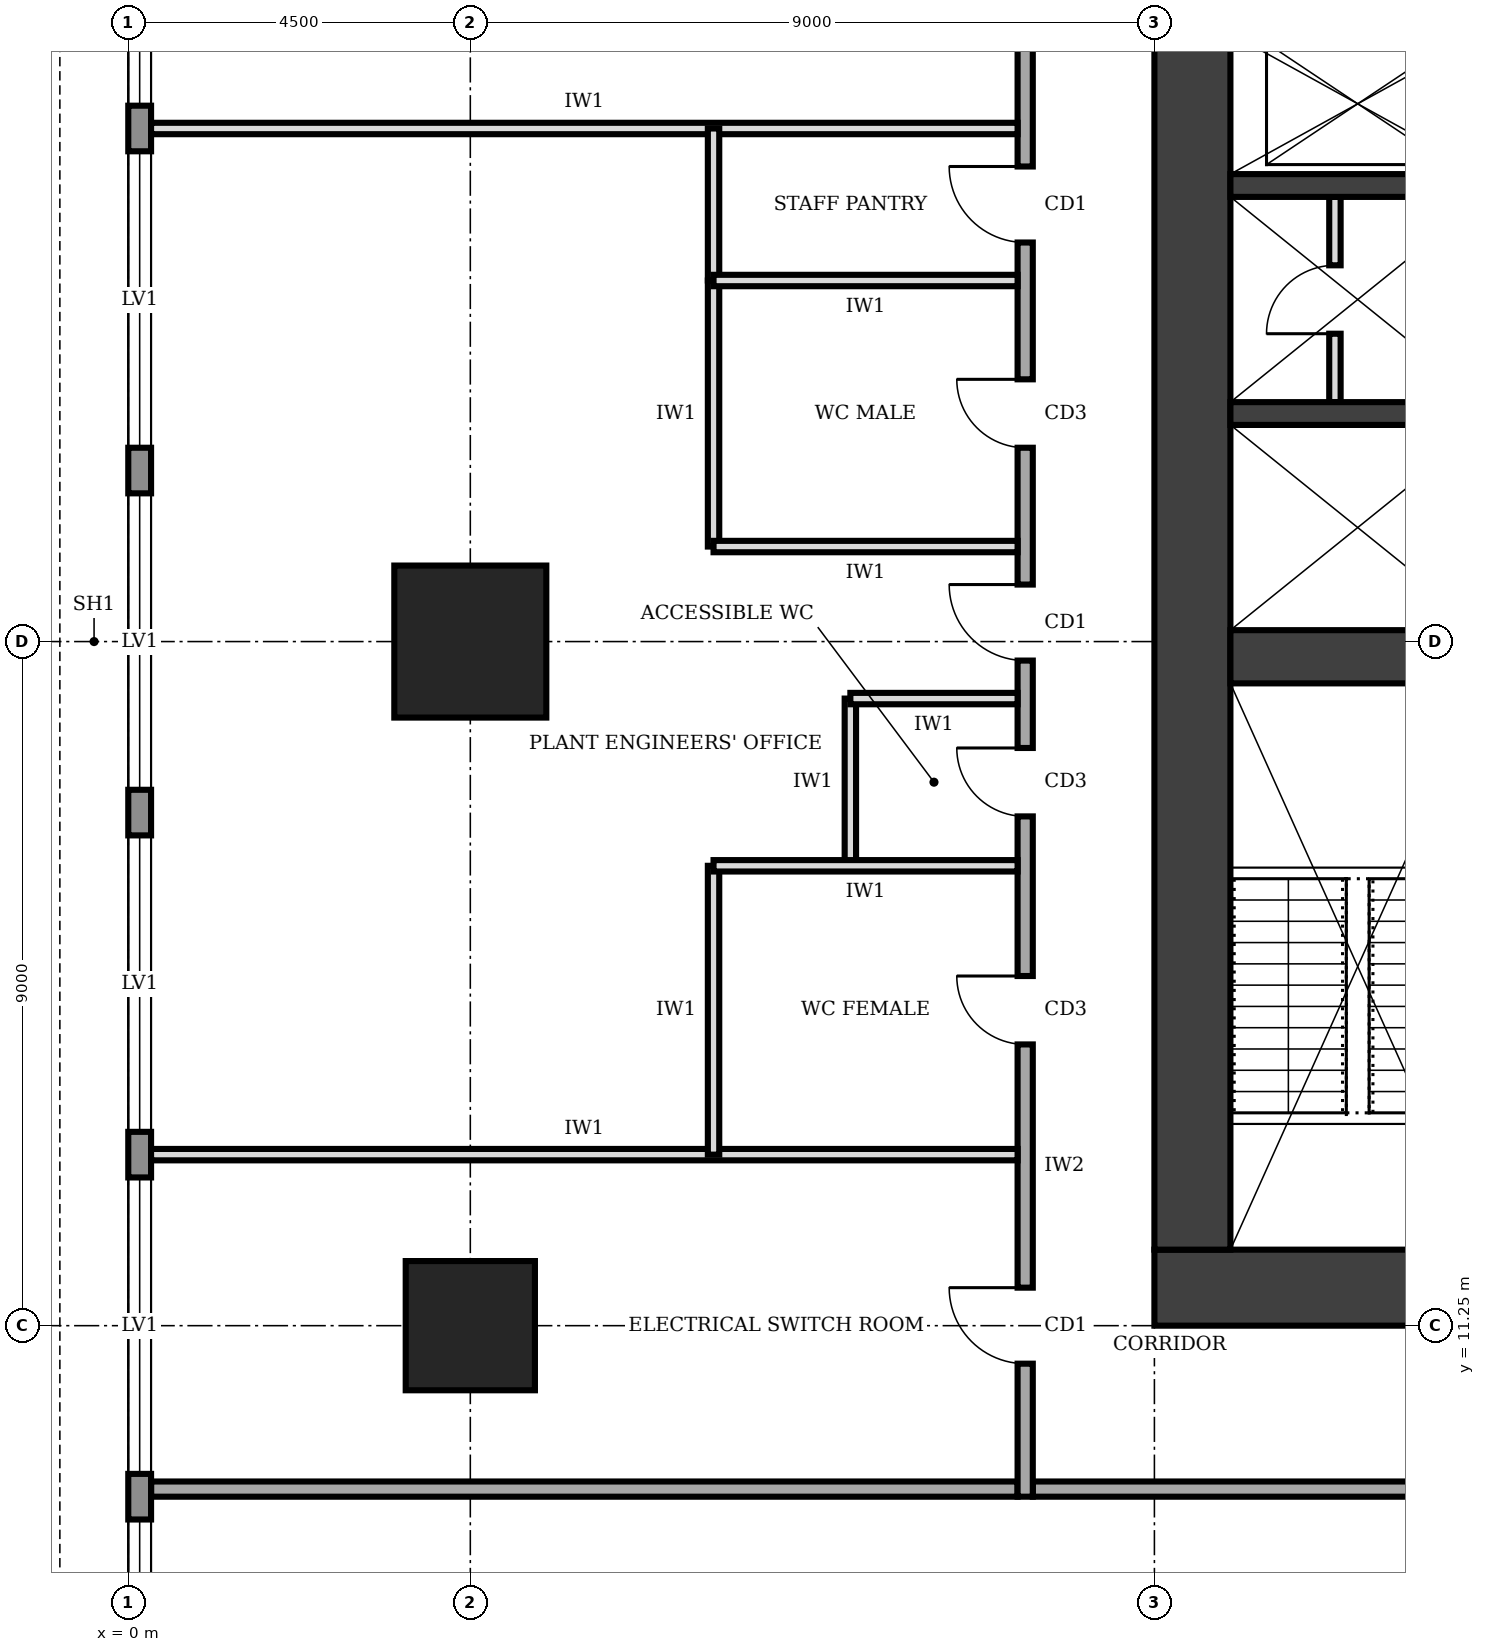
"""IFC4 building model, lengths in metres.
Left out: names, types, materials, properties, quantities, classifications, styles, units other than length and angle.
Written with IfcOpenShell. Run it as: python <this file> out.ifc"""

import sys

from ifc_helpers import new_model, si_unit, direction, frame, frame_2d, origin, origin_2d, place, context, subcontext, project, spatial, rectangle, extrude, element, fill, save


model = new_model("IFC4")
c1 = context("Model", 3, precision=1e-05, world=origin(), true_north=direction((0.0, 1.0)))
c2 = subcontext(c1, "Body", "Model", "MODEL_VIEW")
j1 = project(units=[si_unit("LENGTHUNIT", "METRE"), si_unit("PLANEANGLEUNIT", "RADIAN")], contexts=[c1])
p1 = place(None, origin())
s1 = spatial("IfcSite", under=j1, at=p1, CompositionType="ELEMENT")
p2 = place(p1, origin())
s2 = spatial("IfcBuilding", under=s1, at=p2, CompositionType="ELEMENT")
p3 = place(p2, frame((0.0, 0.0, 289.0)))
s3 = spatial("IfcBuildingStorey", under=s2, at=p3, CompositionType="ELEMENT", Elevation=289.0)
p4 = place(p3, frame((13.5, 11.75, 0.0), z_axis=(0.0, 0.0, 1.0), x_axis=(1.0, 0.0, 0.0)))
e1 = element("IfcWall", 1, at=p4, inside=s3, PredefinedType="SHEAR", context=c2, shape_type="SweptSolid", body=[
    extrude(rectangle(XDim=13.5, YDim=1.0, at=frame_2d((6.75, 0.0))), origin(), (0.0, 0.0, 1.0), 4.0),
])
p5 = place(p4, frame((4.75, 0.0, 0.0)))
e2 = element("IfcOpeningElement", 2, at=p5, cuts=e1, PredefinedType="OPENING", context=c2, shape_type="SweptSolid", body=[
    extrude(rectangle(XDim=1.0, YDim=2.1, at=frame_2d((0.5, 1.05))), frame((0.0, 0.51, 0.0), z_axis=(0.0, -1.0, 0.0), x_axis=(1.0, 0.0, 0.0)), (0.0, 0.0, 1.0), 1.02),
])
p6 = place(p3, frame((14.0, 28.25, 0.0), z_axis=(0.0, 0.0, 1.0), x_axis=(0.0, -1.0, 0.0)))
e3 = element("IfcWall", 3, at=p6, inside=s3, PredefinedType="SHEAR", context=c2, shape_type="SweptSolid", body=[
    extrude(rectangle(XDim=16.0, YDim=1.0, at=frame_2d((8.0, 0.0))), origin(), (0.0, 0.0, 1.0), 4.0),
])
p7 = place(p3, frame((14.5, 20.05, 0.0), z_axis=(0.0, 0.0, 1.0), x_axis=(1.0, 0.0, 0.0)))
e4 = element("IfcWall", 4, at=p7, inside=s3, PredefinedType="SHEAR", context=c2, shape_type="SweptSolid", body=[
    extrude(rectangle(XDim=3.35, YDim=0.7, at=frame_2d((1.675, 0.0))), origin(), (0.0, 0.0, 1.0), 4.0),
])
for number, where, z_axis, x_axis in (
    (5, (14.5, 23.25, 0.0), (0.0, 0.0, 1.0), (1.0, 0.0, 0.0)),
    (6, (14.5, 26.25, 0.0), (0.0, 0.0, 1.0), (1.0, 0.0, 0.0)),
):
    element("IfcWall", number, at=place(p3, frame(where, z_axis=z_axis, x_axis=x_axis)), inside=s3, PredefinedType="SHEAR", context=c2, shape_type="SweptSolid", body=[
        extrude(rectangle(XDim=3.35, YDim=0.3, at=frame_2d((1.675, 0.0))), origin(), (0.0, 0.0, 1.0), 4.0),
    ])
p8 = place(p3, frame((4.5, 11.25, 0.0), z_axis=(0.0, 0.0, 1.0), x_axis=(1.0, 0.0, 0.0)))
e7 = element("IfcColumn", 7, at=p8, inside=s3, PredefinedType="COLUMN", context=c2, shape_type="SweptSolid", body=[
    extrude(rectangle(XDim=1.7, YDim=1.7, at=origin_2d()), origin(), (0.0, 0.0, 1.0), 4.0),
])
p9 = place(p3, frame((4.5, 20.25, 0.0), z_axis=(0.0, 0.0, 1.0), x_axis=(1.0, 0.0, 0.0)))
e8 = element("IfcColumn", 8, at=p9, inside=s3, PredefinedType="COLUMN", context=c2, shape_type="SweptSolid", body=[
    extrude(rectangle(XDim=2.0, YDim=2.0, at=origin_2d()), origin(), (0.0, 0.0, 1.0), 4.0),
])
p10 = place(p3, frame((0.15, 35.98, 0.0), z_axis=(0.0, 0.0, 1.0), x_axis=(0.0, -1.0, 0.0)))
e9 = element("IfcWall", 9, at=p10, inside=s3, PredefinedType="STANDARD", context=c2, shape_type="SweptSolid", body=[
    extrude(rectangle(XDim=31.46, YDim=0.3, at=frame_2d((15.73, 0.0))), origin(), (0.0, 0.0, 1.0), 3.75),
])
p11 = place(p10, frame((27.28, 0.0, 0.9)))
e10 = element("IfcOpeningElement", 10, at=p11, cuts=e9, PredefinedType="OPENING", context=c2, shape_type="SweptSolid", body=[
    extrude(rectangle(XDim=3.9, YDim=2.2, at=frame_2d((1.95, 1.1))), frame((0.0, 0.16, 0.0), z_axis=(0.0, -1.0, 0.0), x_axis=(1.0, 0.0, 0.0)), (0.0, 0.0, 1.0), 0.32),
])
p12 = place(p10, frame((22.78, 0.0, 0.9)))
e11 = element("IfcOpeningElement", 11, at=p12, cuts=e9, PredefinedType="OPENING", context=c2, shape_type="SweptSolid", body=[
    extrude(rectangle(XDim=3.9, YDim=2.2, at=frame_2d((1.95, 1.1))), frame((0.0, 0.16, 0.0), z_axis=(0.0, -1.0, 0.0), x_axis=(1.0, 0.0, 0.0)), (0.0, 0.0, 1.0), 0.32),
])
p13 = place(p10, frame((18.28, 0.0, 0.9)))
e12 = element("IfcOpeningElement", 12, at=p13, cuts=e9, PredefinedType="OPENING", context=c2, shape_type="SweptSolid", body=[
    extrude(rectangle(XDim=3.9, YDim=2.2, at=frame_2d((1.95, 1.1))), frame((0.0, 0.16, 0.0), z_axis=(0.0, -1.0, 0.0), x_axis=(1.0, 0.0, 0.0)), (0.0, 0.0, 1.0), 0.32),
])
p14 = place(p10, frame((13.78, 0.0, 0.9)))
e13 = element("IfcOpeningElement", 13, at=p14, cuts=e9, PredefinedType="OPENING", context=c2, shape_type="SweptSolid", body=[
    extrude(rectangle(XDim=3.9, YDim=2.2, at=frame_2d((1.95, 1.1))), frame((0.0, 0.16, 0.0), z_axis=(0.0, -1.0, 0.0), x_axis=(1.0, 0.0, 0.0)), (0.0, 0.0, 1.0), 0.32),
])
p15 = place(p10, frame((9.28, 0.0, 0.9)))
e14 = element("IfcOpeningElement", 14, at=p15, cuts=e9, PredefinedType="OPENING", context=c2, shape_type="SweptSolid", body=[
    extrude(rectangle(XDim=3.9, YDim=2.2, at=frame_2d((1.95, 1.1))), frame((0.0, 0.16, 0.0), z_axis=(0.0, -1.0, 0.0), x_axis=(1.0, 0.0, 0.0)), (0.0, 0.0, 1.0), 0.32),
])
p16 = place(p10, frame((4.78, 0.0, 0.9)))
e15 = element("IfcOpeningElement", 15, at=p16, cuts=e9, PredefinedType="OPENING", context=c2, shape_type="SweptSolid", body=[
    extrude(rectangle(XDim=3.9, YDim=2.2, at=frame_2d((1.95, 1.1))), frame((0.0, 0.16, 0.0), z_axis=(0.0, -1.0, 0.0), x_axis=(1.0, 0.0, 0.0)), (0.0, 0.0, 1.0), 0.32),
])
p17 = place(p3, frame((15.875, 23.4, 0.0), z_axis=(0.0, 0.0, 1.0), x_axis=(0.0, 1.0, 0.0)))
e16 = element("IfcWall", 16, at=p17, inside=s3, PredefinedType="PARTITIONING", context=c2, shape_type="SweptSolid", body=[
    extrude(rectangle(XDim=2.7, YDim=0.15, at=frame_2d((1.35, 0.0))), origin(), (0.0, 0.0, 1.0), 3.75),
])
p18 = place(p17, frame((0.9, 0.0, 0.0)))
e17 = element("IfcOpeningElement", 17, at=p18, cuts=e16, PredefinedType="OPENING", context=c2, shape_type="SweptSolid", body=[
    extrude(rectangle(XDim=0.9, YDim=2.1, at=frame_2d((0.45, 1.05))), frame((0.0, 0.085, 0.0), z_axis=(0.0, -1.0, 0.0), x_axis=(1.0, 0.0, 0.0)), (0.0, 0.0, 1.0), 0.17),
])
p19 = place(p3, frame((11.9, 9.1, 0.0), z_axis=(0.0, 0.0, 1.0), x_axis=(1.0, 0.0, 0.0)))
e18 = element("IfcWall", 18, at=p19, inside=s3, PredefinedType="SOLIDWALL", context=c2, shape_type="SweptSolid", body=[
    extrude(rectangle(XDim=16.9, YDim=0.2, at=frame_2d((8.45, 0.0))), origin(), (0.0, 0.0, 1.0), 3.75),
])
p20 = place(p19, frame((7.15, 0.0, 0.0)))
e19 = element("IfcOpeningElement", 19, at=p20, cuts=e18, PredefinedType="OPENING", context=c2, shape_type="SweptSolid", body=[
    extrude(rectangle(XDim=2.4, YDim=2.7, at=frame_2d((1.2, 1.35))), frame((0.0, 0.11, 0.0), z_axis=(0.0, -1.0, 0.0), x_axis=(1.0, 0.0, 0.0)), (0.0, 0.0, 1.0), 0.22),
])
p21 = place(p3, frame((11.8, 31.3, 0.0), z_axis=(0.0, 0.0, 1.0), x_axis=(0.0, -1.0, 0.0)))
e20 = element("IfcWall", 20, at=p21, inside=s3, PredefinedType="SOLIDWALL", context=c2, shape_type="SweptSolid", body=[
    extrude(rectangle(XDim=22.3, YDim=0.2, at=frame_2d((11.15, 0.0))), origin(), (0.0, 0.0, 1.0), 3.75),
])
p22 = place(p21, frame((19.55, 0.0, 0.0)))
e21 = element("IfcOpeningElement", 21, at=p22, cuts=e20, PredefinedType="OPENING", context=c2, shape_type="SweptSolid", body=[
    extrude(rectangle(XDim=1.0, YDim=2.1, at=frame_2d((0.5, 1.05))), frame((0.0, 0.11, 0.0), z_axis=(0.0, -1.0, 0.0), x_axis=(1.0, 0.0, 0.0)), (0.0, 0.0, 1.0), 0.22),
])
p23 = place(p21, frame((15.45, 0.0, 0.0)))
e22 = element("IfcOpeningElement", 22, at=p23, cuts=e20, PredefinedType="OPENING", context=c2, shape_type="SweptSolid", body=[
    extrude(rectangle(XDim=0.9, YDim=2.1, at=frame_2d((0.45, 1.05))), frame((0.0, 0.11, 0.0), z_axis=(0.0, -1.0, 0.0), x_axis=(1.0, 0.0, 0.0)), (0.0, 0.0, 1.0), 0.22),
])
p24 = place(p21, frame((12.45, 0.0, 0.0)))
e23 = element("IfcOpeningElement", 23, at=p24, cuts=e20, PredefinedType="OPENING", context=c2, shape_type="SweptSolid", body=[
    extrude(rectangle(XDim=0.9, YDim=2.1, at=frame_2d((0.45, 1.05))), frame((0.0, 0.11, 0.0), z_axis=(0.0, -1.0, 0.0), x_axis=(1.0, 0.0, 0.0)), (0.0, 0.0, 1.0), 0.22),
])
p25 = place(p21, frame((7.6, 0.0, 0.0)))
e24 = element("IfcOpeningElement", 24, at=p25, cuts=e20, PredefinedType="OPENING", context=c2, shape_type="SweptSolid", body=[
    extrude(rectangle(XDim=0.9, YDim=2.1, at=frame_2d((0.45, 1.05))), frame((0.0, 0.11, 0.0), z_axis=(0.0, -1.0, 0.0), x_axis=(1.0, 0.0, 0.0)), (0.0, 0.0, 1.0), 0.22),
])
p26 = place(p21, frame((4.8, 0.0, 0.0)))
e25 = element("IfcOpeningElement", 25, at=p26, cuts=e20, PredefinedType="OPENING", context=c2, shape_type="SweptSolid", body=[
    extrude(rectangle(XDim=1.0, YDim=2.1, at=frame_2d((0.5, 1.05))), frame((0.0, 0.11, 0.0), z_axis=(0.0, -1.0, 0.0), x_axis=(1.0, 0.0, 0.0)), (0.0, 0.0, 1.0), 0.22),
])
p27 = place(p21, frame((10.3, 0.0, 0.0)))
e26 = element("IfcOpeningElement", 26, at=p27, cuts=e20, PredefinedType="OPENING", context=c2, shape_type="SweptSolid", body=[
    extrude(rectangle(XDim=1.0, YDim=2.1, at=frame_2d((0.5, 1.05))), frame((0.0, 0.11, 0.0), z_axis=(0.0, -1.0, 0.0), x_axis=(1.0, 0.0, 0.0)), (0.0, 0.0, 1.0), 0.22),
])
p28 = place(p21, frame((1.55, 0.0, 0.0)))
e27 = element("IfcOpeningElement", 27, at=p28, cuts=e20, PredefinedType="OPENING", context=c2, shape_type="SweptSolid", body=[
    extrude(rectangle(XDim=1.0, YDim=2.1, at=frame_2d((0.5, 1.05))), frame((0.0, 0.11, 0.0), z_axis=(0.0, -1.0, 0.0), x_axis=(1.0, 0.0, 0.0)), (0.0, 0.0, 1.0), 0.22),
])
p29 = place(p3, frame((0.3, 9.1, 0.0), z_axis=(0.0, 0.0, 1.0), x_axis=(1.0, 0.0, 0.0)))
e28 = element("IfcWall", 28, at=p29, inside=s3, PredefinedType="SOLIDWALL", context=c2, shape_type="SweptSolid", body=[
    extrude(rectangle(XDim=11.4, YDim=0.2, at=frame_2d((5.7, 0.0))), origin(), (0.0, 0.0, 1.0), 3.75),
])
for number, where, z_axis, x_axis in (
    (29, (0.3, 13.5, 0.0), (0.0, 0.0, 1.0), (1.0, 0.0, 0.0)),
    (30, (0.3, 27.0, 0.0), (0.0, 0.0, 1.0), (1.0, 0.0, 0.0)),
):
    element("IfcWall", number, at=place(p3, frame(where, z_axis=z_axis, x_axis=x_axis)), inside=s3, PredefinedType="PARTITIONING", context=c2, shape_type="SweptSolid", body=[
        extrude(rectangle(XDim=11.4, YDim=0.15, at=frame_2d((5.7, 0.0))), origin(), (0.0, 0.0, 1.0), 3.75),
    ])
p30 = place(p3, frame((11.7, 17.3, 0.0), z_axis=(0.0, 0.0, 1.0), x_axis=(-1.0, 0.0, 0.0)))
e31 = element("IfcWall", 31, at=p30, inside=s3, PredefinedType="PARTITIONING", context=c2, shape_type="SweptSolid", body=[
    extrude(rectangle(XDim=4.0, YDim=0.15, at=frame_2d((2.0, 0.0))), origin(), (0.0, 0.0, 1.0), 3.75),
])
p31 = place(p3, frame((11.7, 19.5, 0.0), z_axis=(0.0, 0.0, 1.0), x_axis=(-1.0, 0.0, 0.0)))
e32 = element("IfcWall", 32, at=p31, inside=s3, PredefinedType="PARTITIONING", context=c2, shape_type="SweptSolid", body=[
    extrude(rectangle(XDim=2.2, YDim=0.15, at=frame_2d((1.1, 0.0))), origin(), (0.0, 0.0, 1.0), 2.85),
])
for number, where, z_axis, x_axis in (
    (33, (11.7, 21.5, 0.0), (0.0, 0.0, 1.0), (-1.0, 0.0, 0.0)),
    (34, (11.7, 25.0, 0.0), (0.0, 0.0, 1.0), (-1.0, 0.0, 0.0)),
):
    element("IfcWall", number, at=place(p3, frame(where, z_axis=z_axis, x_axis=x_axis)), inside=s3, PredefinedType="PARTITIONING", context=c2, shape_type="SweptSolid", body=[
        extrude(rectangle(XDim=4.0, YDim=0.15, at=frame_2d((2.0, 0.0))), origin(), (0.0, 0.0, 1.0), 3.75),
    ])
p32 = place(p3, frame((7.7, 13.5, 0.0), z_axis=(0.0, 0.0, 1.0), x_axis=(0.0, 1.0, 0.0)))
e35 = element("IfcWall", 35, at=p32, inside=s3, PredefinedType="PARTITIONING", context=c2, shape_type="SweptSolid", body=[
    extrude(rectangle(XDim=3.8, YDim=0.15, at=frame_2d((1.9, 0.0))), origin(), (0.0, 0.0, 1.0), 3.75),
])
p33 = place(p3, frame((9.5, 17.3, 0.0), z_axis=(0.0, 0.0, 1.0), x_axis=(0.0, 1.0, 0.0)))
e36 = element("IfcWall", 36, at=p33, inside=s3, PredefinedType="PARTITIONING", context=c2, shape_type="SweptSolid", body=[
    extrude(rectangle(XDim=2.2, YDim=0.15, at=frame_2d((1.1, 0.0))), origin(), (0.0, 0.0, 1.0), 3.75),
])
p34 = place(p3, frame((7.7, 21.5, 0.0), z_axis=(0.0, 0.0, 1.0), x_axis=(0.0, 1.0, 0.0)))
e37 = element("IfcWall", 37, at=p34, inside=s3, PredefinedType="PARTITIONING", context=c2, shape_type="SweptSolid", body=[
    extrude(rectangle(XDim=3.5, YDim=0.15, at=frame_2d((1.75, 0.0))), origin(), (0.0, 0.0, 1.0), 3.75),
])
p35 = place(p3, frame((7.7, 25.0, 0.0), z_axis=(0.0, 0.0, 1.0), x_axis=(0.0, 1.0, 0.0)))
e38 = element("IfcWall", 38, at=p35, inside=s3, PredefinedType="PARTITIONING", context=c2, shape_type="SweptSolid", body=[
    extrude(rectangle(XDim=2.0, YDim=0.15, at=frame_2d((1.0, 0.0))), origin(), (0.0, 0.0, 1.0), 3.75),
])
p36 = place(p11, origin())
e39 = element("IfcWindow", 39, at=p36, inside=s3, PartitioningType="SINGLE_PANEL", PredefinedType="WINDOW", context=c2, shape_type="SweptSolid", body=[
    extrude(rectangle(XDim=3.9, YDim=2.2, at=frame_2d((1.95, 1.1))), frame((0.0, 0.03, 0.0), z_axis=(0.0, -1.0, 0.0), x_axis=(1.0, 0.0, 0.0)), (0.0, 0.0, 1.0), 0.06),
])
fill(e10, e39)
p37 = place(p12, origin())
e40 = element("IfcWindow", 40, at=p37, inside=s3, PartitioningType="SINGLE_PANEL", PredefinedType="WINDOW", context=c2, shape_type="SweptSolid", body=[
    extrude(rectangle(XDim=3.9, YDim=2.2, at=frame_2d((1.95, 1.1))), frame((0.0, 0.03, 0.0), z_axis=(0.0, -1.0, 0.0), x_axis=(1.0, 0.0, 0.0)), (0.0, 0.0, 1.0), 0.06),
])
fill(e11, e40)
p38 = place(p13, origin())
e41 = element("IfcWindow", 41, at=p38, inside=s3, PartitioningType="SINGLE_PANEL", PredefinedType="WINDOW", context=c2, shape_type="SweptSolid", body=[
    extrude(rectangle(XDim=3.9, YDim=2.2, at=frame_2d((1.95, 1.1))), frame((0.0, 0.03, 0.0), z_axis=(0.0, -1.0, 0.0), x_axis=(1.0, 0.0, 0.0)), (0.0, 0.0, 1.0), 0.06),
])
fill(e12, e41)
p39 = place(p14, origin())
e42 = element("IfcWindow", 42, at=p39, inside=s3, PartitioningType="SINGLE_PANEL", PredefinedType="WINDOW", context=c2, shape_type="SweptSolid", body=[
    extrude(rectangle(XDim=3.9, YDim=2.2, at=frame_2d((1.95, 1.1))), frame((0.0, 0.03, 0.0), z_axis=(0.0, -1.0, 0.0), x_axis=(1.0, 0.0, 0.0)), (0.0, 0.0, 1.0), 0.06),
])
fill(e13, e42)
p40 = place(p15, origin())
e43 = element("IfcWindow", 43, at=p40, inside=s3, PartitioningType="SINGLE_PANEL", PredefinedType="WINDOW", context=c2, shape_type="SweptSolid", body=[
    extrude(rectangle(XDim=3.9, YDim=2.2, at=frame_2d((1.95, 1.1))), frame((0.0, 0.03, 0.0), z_axis=(0.0, -1.0, 0.0), x_axis=(1.0, 0.0, 0.0)), (0.0, 0.0, 1.0), 0.06),
])
fill(e14, e43)
p41 = place(p16, origin())
e44 = element("IfcWindow", 44, at=p41, inside=s3, PartitioningType="SINGLE_PANEL", PredefinedType="WINDOW", context=c2, shape_type="SweptSolid", body=[
    extrude(rectangle(XDim=3.9, YDim=2.2, at=frame_2d((1.95, 1.1))), frame((0.0, 0.03, 0.0), z_axis=(0.0, -1.0, 0.0), x_axis=(1.0, 0.0, 0.0)), (0.0, 0.0, 1.0), 0.06),
])
fill(e15, e44)
p42 = place(p18, origin())
e45 = element("IfcDoor", 45, at=p42, inside=s3, OperationType="SINGLE_SWING_LEFT", PredefinedType="DOOR", context=c2, shape_type="SweptSolid", body=[
    extrude(rectangle(XDim=0.9, YDim=2.1, at=frame_2d((0.45, 1.05))), frame((0.0, 0.025, 0.0), z_axis=(0.0, -1.0, 0.0), x_axis=(1.0, 0.0, 0.0)), (0.0, 0.0, 1.0), 0.05),
])
fill(e17, e45)
p43 = place(p22, frame((1.0, 0.0, 0.0), z_axis=(0.0, 0.0, 1.0), x_axis=(-1.0, 0.0, 0.0)))
e46 = element("IfcDoor", 46, at=p43, inside=s3, OperationType="SINGLE_SWING_RIGHT", PredefinedType="DOOR", context=c2, shape_type="SweptSolid", body=[
    extrude(rectangle(XDim=1.0, YDim=2.1, at=frame_2d((0.5, 1.05))), frame((0.0, 0.025, 0.0), z_axis=(0.0, -1.0, 0.0), x_axis=(1.0, 0.0, 0.0)), (0.0, 0.0, 1.0), 0.05),
])
fill(e21, e46)
p44 = place(p23, frame((0.9, 0.0, 0.0), z_axis=(0.0, 0.0, 1.0), x_axis=(-1.0, 0.0, 0.0)))
e47 = element("IfcDoor", 47, at=p44, inside=s3, OperationType="SINGLE_SWING_RIGHT", PredefinedType="DOOR", context=c2, shape_type="SweptSolid", body=[
    extrude(rectangle(XDim=0.9, YDim=2.1, at=frame_2d((0.45, 1.05))), frame((0.0, 0.025, 0.0), z_axis=(0.0, -1.0, 0.0), x_axis=(1.0, 0.0, 0.0)), (0.0, 0.0, 1.0), 0.05),
])
fill(e22, e47)
p45 = place(p24, frame((0.9, 0.0, 0.0), z_axis=(0.0, 0.0, 1.0), x_axis=(-1.0, 0.0, 0.0)))
e48 = element("IfcDoor", 48, at=p45, inside=s3, OperationType="SINGLE_SWING_RIGHT", PredefinedType="DOOR", context=c2, shape_type="SweptSolid", body=[
    extrude(rectangle(XDim=0.9, YDim=2.1, at=frame_2d((0.45, 1.05))), frame((0.0, 0.025, 0.0), z_axis=(0.0, -1.0, 0.0), x_axis=(1.0, 0.0, 0.0)), (0.0, 0.0, 1.0), 0.05),
])
fill(e23, e48)
p46 = place(p25, frame((0.9, 0.0, 0.0), z_axis=(0.0, 0.0, 1.0), x_axis=(-1.0, 0.0, 0.0)))
e49 = element("IfcDoor", 49, at=p46, inside=s3, OperationType="SINGLE_SWING_RIGHT", PredefinedType="DOOR", context=c2, shape_type="SweptSolid", body=[
    extrude(rectangle(XDim=0.9, YDim=2.1, at=frame_2d((0.45, 1.05))), frame((0.0, 0.025, 0.0), z_axis=(0.0, -1.0, 0.0), x_axis=(1.0, 0.0, 0.0)), (0.0, 0.0, 1.0), 0.05),
])
fill(e24, e49)
p47 = place(p26, frame((1.0, 0.0, 0.0), z_axis=(0.0, 0.0, 1.0), x_axis=(-1.0, 0.0, 0.0)))
e50 = element("IfcDoor", 50, at=p47, inside=s3, OperationType="SINGLE_SWING_RIGHT", PredefinedType="DOOR", context=c2, shape_type="SweptSolid", body=[
    extrude(rectangle(XDim=1.0, YDim=2.1, at=frame_2d((0.5, 1.05))), frame((0.0, 0.025, 0.0), z_axis=(0.0, -1.0, 0.0), x_axis=(1.0, 0.0, 0.0)), (0.0, 0.0, 1.0), 0.05),
])
fill(e25, e50)
p48 = place(p27, frame((1.0, 0.0, 0.0), z_axis=(0.0, 0.0, 1.0), x_axis=(-1.0, 0.0, 0.0)))
e51 = element("IfcDoor", 51, at=p48, inside=s3, OperationType="SINGLE_SWING_RIGHT", PredefinedType="DOOR", context=c2, shape_type="SweptSolid", body=[
    extrude(rectangle(XDim=1.0, YDim=2.1, at=frame_2d((0.5, 1.05))), frame((0.0, 0.025, 0.0), z_axis=(0.0, -1.0, 0.0), x_axis=(1.0, 0.0, 0.0)), (0.0, 0.0, 1.0), 0.05),
])
fill(e26, e51)
save(model, sys.argv[1])
